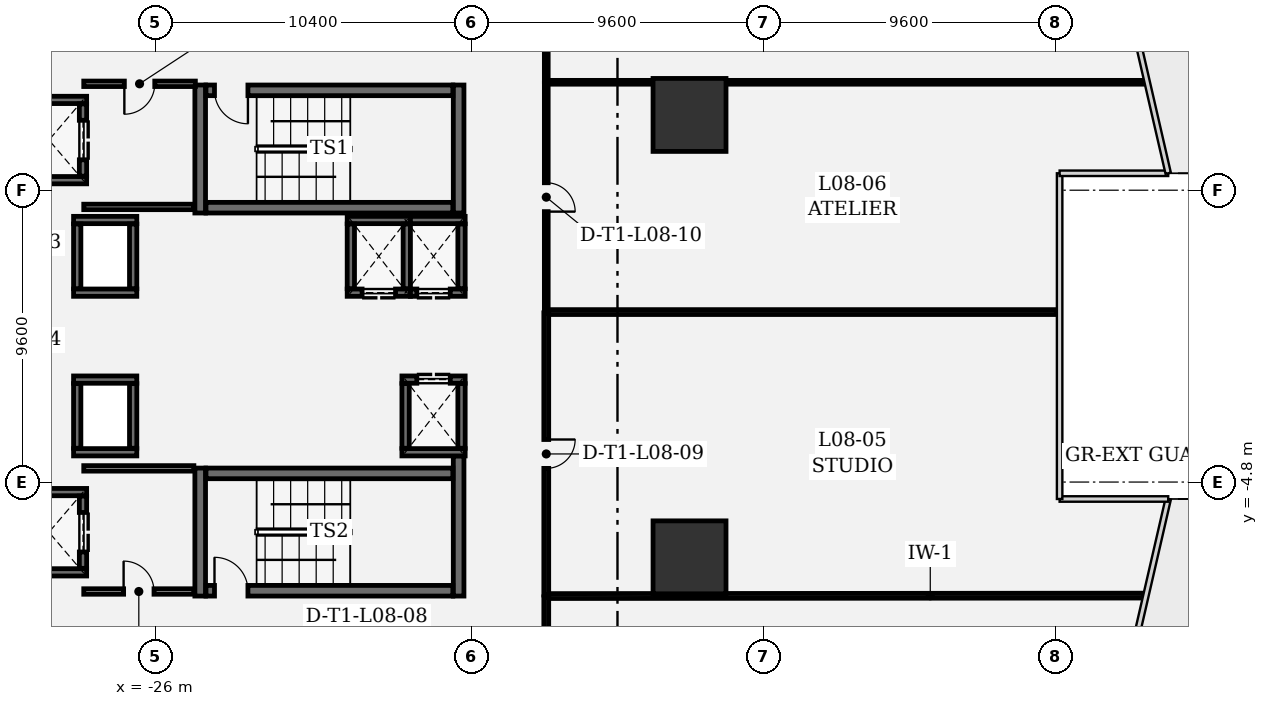
"""IFC4 building model, lengths in metres.
Left out: names, types, materials, properties, quantities, classifications, styles, units other than length and angle.
Written with IfcOpenShell. Run it as: python <this file> out.ifc"""

import sys

from ifc_helpers import new_model, si_unit, direction, frame, frame_2d, origin, origin_2d, place, context, subcontext, project, spatial, rectangle, extrude, element, fill, save


model = new_model("IFC4")
c1 = context("Model", 3, precision=1e-05, world=origin(), true_north=direction((0.0, 1.0)))
c2 = subcontext(c1, "Body", "Model", "MODEL_VIEW")
j1 = project(units=[si_unit("LENGTHUNIT", "METRE"), si_unit("PLANEANGLEUNIT", "RADIAN")], contexts=[c1])
p1 = place(None, origin())
s1 = spatial("IfcSite", under=j1, at=p1, CompositionType="ELEMENT")
p2 = place(p1, origin())
s2 = spatial("IfcBuilding", under=s1, at=p2, CompositionType="ELEMENT")
p3 = place(p2, frame((0.0, 0.0, 40.8)))
s3 = spatial("IfcBuildingStorey", under=s2, at=p3, CompositionType="ELEMENT", Elevation=40.8)
for number, where, z_axis, x_axis in (
    (1, (-8.43, -7.276, 0.0), (0.0, 0.0, 1.0), (1.0, 0.0, 0.0)),
    (2, (-8.43, 7.276, 0.0), (0.0, 0.0, 1.0), (1.0, 0.0, 0.0)),
):
    element("IfcColumn", number, at=place(p3, frame(where, z_axis=z_axis, x_axis=x_axis)), inside=s3, PredefinedType="COLUMN", context=c2, shape_type="SweptSolid", body=[
        extrude(rectangle(XDim=2.4, YDim=2.4, at=origin_2d()), origin(), (0.0, 0.0, 1.0), 4.2),
    ])
for number, where, z_axis, x_axis in (
    (3, (-24.525, 8.26, 0.0), (0.0, 0.0, 1.0), (0.0, -1.0, 0.0)),
    (4, (-16.025, 4.05, 0.0), (0.0, 0.0, 1.0), (0.0, 1.0, 0.0)),
):
    element("IfcWall", number, at=place(p3, frame(where, z_axis=z_axis, x_axis=x_axis)), inside=s3, PredefinedType="SHEAR", context=c2, shape_type="SweptSolid", body=[
        extrude(rectangle(XDim=4.21, YDim=0.35, at=frame_2d((2.105, 0.0))), origin(), (0.0, 0.0, 1.0), 3.92),
    ])
p4 = place(p3, frame((-24.335, 4.225, 0.0), z_axis=(0.0, 0.0, 1.0), x_axis=(1.0, 0.0, 0.0)))
e5 = element("IfcWall", 5, at=p4, inside=s3, PredefinedType="SHEAR", context=c2, shape_type="SweptSolid", body=[
    extrude(rectangle(XDim=8.12, YDim=0.35, at=frame_2d((4.06, 0.0))), origin(), (0.0, 0.0, 1.0), 3.92),
])
p5 = place(p3, frame((-16.215, 8.085, 0.0), z_axis=(0.0, 0.0, 1.0), x_axis=(-1.0, 0.0, 0.0)))
e6 = element("IfcWall", 6, at=p5, inside=s3, PredefinedType="SHEAR", context=c2, shape_type="SweptSolid", body=[
    extrude(rectangle(XDim=8.12, YDim=0.35, at=frame_2d((4.06, 0.0))), origin(), (0.0, 0.0, 1.0), 3.92),
])
p6 = place(p5, frame((6.74, 0.0, 0.0)))
e7 = element("IfcOpeningElement", 7, at=p6, cuts=e6, PredefinedType="OPENING", context=c2, shape_type="SweptSolid", body=[
    extrude(rectangle(XDim=1.1, YDim=2.2, at=frame_2d((0.55, 1.1))), frame((0.0, 0.185, 0.0), z_axis=(0.0, -1.0, 0.0), x_axis=(1.0, 0.0, 0.0)), (0.0, 0.0, 1.0), 0.37),
])
p7 = place(p3, frame((-24.525, -4.34, 0.0), z_axis=(0.0, 0.0, 1.0), x_axis=(0.0, -1.0, 0.0)))
e8 = element("IfcWall", 8, at=p7, inside=s3, PredefinedType="SHEAR", context=c2, shape_type="SweptSolid", body=[
    extrude(rectangle(XDim=4.21, YDim=0.35, at=frame_2d((2.105, 0.0))), origin(), (0.0, 0.0, 1.0), 3.92),
])
p8 = place(p3, frame((-16.025, -8.55, 0.0), z_axis=(0.0, 0.0, 1.0), x_axis=(0.0, 1.0, 0.0)))
e9 = element("IfcWall", 9, at=p8, inside=s3, PredefinedType="SHEAR", context=c2, shape_type="SweptSolid", body=[
    extrude(rectangle(XDim=4.61, YDim=0.35, at=frame_2d((2.305, 0.0))), origin(), (0.0, 0.0, 1.0), 3.92),
])
p9 = place(p3, frame((-24.335, -8.375, 0.0), z_axis=(0.0, 0.0, 1.0), x_axis=(1.0, 0.0, 0.0)))
e10 = element("IfcWall", 10, at=p9, inside=s3, PredefinedType="SHEAR", context=c2, shape_type="SweptSolid", body=[
    extrude(rectangle(XDim=8.12, YDim=0.35, at=frame_2d((4.06, 0.0))), origin(), (0.0, 0.0, 1.0), 3.92),
])
p10 = place(p9, frame((0.28, 0.0, 0.0)))
e11 = element("IfcOpeningElement", 11, at=p10, cuts=e10, PredefinedType="OPENING", context=c2, shape_type="SweptSolid", body=[
    extrude(rectangle(XDim=1.1, YDim=2.2, at=frame_2d((0.55, 1.1))), frame((0.0, 0.185, 0.0), z_axis=(0.0, -1.0, 0.0), x_axis=(1.0, 0.0, 0.0)), (0.0, 0.0, 1.0), 0.37),
])
p11 = place(p3, frame((-16.215, -4.515, 0.0), z_axis=(0.0, 0.0, 1.0), x_axis=(-1.0, 0.0, 0.0)))
e12 = element("IfcWall", 12, at=p11, inside=s3, PredefinedType="SHEAR", context=c2, shape_type="SweptSolid", body=[
    extrude(rectangle(XDim=8.12, YDim=0.35, at=frame_2d((4.06, 0.0))), origin(), (0.0, 0.0, 1.0), 3.92),
])
for number, where, z_axis, x_axis in (
    (13, (-28.26, 5.13, 0.0), (0.0, 0.0, 1.0), (-1.0, 0.0, 0.0)),
    (14, (-30.74, 7.77, 0.0), (0.0, 0.0, 1.0), (1.0, 0.0, 0.0)),
):
    element("IfcWall", number, at=place(p3, frame(where, z_axis=z_axis, x_axis=x_axis)), inside=s3, PredefinedType="SHEAR", context=c2, shape_type="SweptSolid", body=[
        extrude(rectangle(XDim=2.48, YDim=0.24, at=frame_2d((1.24, 0.0))), origin(), (0.0, 0.0, 1.0), 3.92),
    ])
p12 = place(p3, frame((-28.38, 7.638, 0.0), z_axis=(0.0, 0.0, 1.0), x_axis=(0.0, -1.0, 0.0)))
e15 = element("IfcWall", 15, at=p12, inside=s3, PredefinedType="SHEAR", context=c2, shape_type="SweptSolid", body=[
    extrude(rectangle(XDim=2.376, YDim=0.24, at=frame_2d((1.188, 0.0))), origin(), (0.0, 0.0, 1.0), 3.92),
])
p13 = place(p12, frame((0.538, 0.0, 0.0)))
e16 = element("IfcOpeningElement", 16, at=p13, cuts=e15, PredefinedType="OPENING", context=c2, shape_type="SweptSolid", body=[
    extrude(rectangle(XDim=1.3, YDim=2.3, at=frame_2d((0.65, 1.15))), frame((0.0, 0.13, 0.0), z_axis=(0.0, -1.0, 0.0), x_axis=(1.0, 0.0, 0.0)), (0.0, 0.0, 1.0), 0.26),
])
for number, where, z_axis, x_axis in (
    (17, (-28.26, -7.77, 0.0), (0.0, 0.0, 1.0), (-1.0, 0.0, 0.0)),
    (18, (-30.74, -5.13, 0.0), (0.0, 0.0, 1.0), (1.0, 0.0, 0.0)),
):
    element("IfcWall", number, at=place(p3, frame(where, z_axis=z_axis, x_axis=x_axis)), inside=s3, PredefinedType="SHEAR", context=c2, shape_type="SweptSolid", body=[
        extrude(rectangle(XDim=2.48, YDim=0.24, at=frame_2d((1.24, 0.0))), origin(), (0.0, 0.0, 1.0), 3.92),
    ])
p14 = place(p3, frame((-28.38, -5.262, 0.0), z_axis=(0.0, 0.0, 1.0), x_axis=(0.0, -1.0, 0.0)))
e19 = element("IfcWall", 19, at=p14, inside=s3, PredefinedType="SHEAR", context=c2, shape_type="SweptSolid", body=[
    extrude(rectangle(XDim=2.376, YDim=0.24, at=frame_2d((1.188, 0.0))), origin(), (0.0, 0.0, 1.0), 3.92),
])
p15 = place(p14, frame((0.538, 0.0, 0.0)))
e20 = element("IfcOpeningElement", 20, at=p15, cuts=e19, PredefinedType="OPENING", context=c2, shape_type="SweptSolid", body=[
    extrude(rectangle(XDim=1.3, YDim=2.3, at=frame_2d((0.65, 1.15))), frame((0.0, 0.13, 0.0), z_axis=(0.0, -1.0, 0.0), x_axis=(1.0, 0.0, 0.0)), (0.0, 0.0, 1.0), 0.26),
])
for number, where, z_axis, x_axis in (
    (21, (-26.61, 1.43, 0.0), (0.0, 0.0, 1.0), (-1.0, 0.0, 0.0)),
    (22, (-28.69, 3.82, 0.0), (0.0, 0.0, 1.0), (1.0, 0.0, 0.0)),
):
    element("IfcWall", number, at=place(p3, frame(where, z_axis=z_axis, x_axis=x_axis)), inside=s3, PredefinedType="SHEAR", context=c2, shape_type="SweptSolid", body=[
        extrude(rectangle(XDim=2.08, YDim=0.24, at=frame_2d((1.04, 0.0))), origin(), (0.0, 0.0, 1.0), 3.92),
    ])
for number, where, z_axis, x_axis in (
    (23, (-28.57, 1.562, 0.0), (0.0, 0.0, 1.0), (0.0, 1.0, 0.0)),
    (24, (-26.73, 3.688, 0.0), (0.0, 0.0, 1.0), (0.0, -1.0, 0.0)),
):
    element("IfcWall", number, at=place(p3, frame(where, z_axis=z_axis, x_axis=x_axis)), inside=s3, PredefinedType="SHEAR", context=c2, shape_type="SweptSolid", body=[
        extrude(rectangle(XDim=2.126, YDim=0.24, at=frame_2d((1.063, 0.0))), origin(), (0.0, 0.0, 1.0), 3.92),
    ])
p16 = place(p3, frame((-17.61, 1.43, 0.0), z_axis=(0.0, 0.0, 1.0), x_axis=(-1.0, 0.0, 0.0)))
e25 = element("IfcWall", 25, at=p16, inside=s3, PredefinedType="SHEAR", context=c2, shape_type="SweptSolid", body=[
    extrude(rectangle(XDim=2.08, YDim=0.24, at=frame_2d((1.04, 0.0))), origin(), (0.0, 0.0, 1.0), 3.92),
])
p17 = place(p16, frame((0.49, 0.0, 0.0)))
e26 = element("IfcOpeningElement", 26, at=p17, cuts=e25, PredefinedType="OPENING", context=c2, shape_type="SweptSolid", body=[
    extrude(rectangle(XDim=1.1, YDim=2.2, at=frame_2d((0.55, 1.1))), frame((0.0, 0.13, 0.0), z_axis=(0.0, -1.0, 0.0), x_axis=(1.0, 0.0, 0.0)), (0.0, 0.0, 1.0), 0.26),
])
p18 = place(p3, frame((-19.69, 3.82, 0.0), z_axis=(0.0, 0.0, 1.0), x_axis=(1.0, 0.0, 0.0)))
e27 = element("IfcWall", 27, at=p18, inside=s3, PredefinedType="SHEAR", context=c2, shape_type="SweptSolid", body=[
    extrude(rectangle(XDim=2.08, YDim=0.24, at=frame_2d((1.04, 0.0))), origin(), (0.0, 0.0, 1.0), 3.92),
])
for number, where, z_axis, x_axis in (
    (28, (-19.57, 1.562, 0.0), (0.0, 0.0, 1.0), (0.0, 1.0, 0.0)),
    (29, (-17.73, 3.688, 0.0), (0.0, 0.0, 1.0), (0.0, -1.0, 0.0)),
):
    element("IfcWall", number, at=place(p3, frame(where, z_axis=z_axis, x_axis=x_axis)), inside=s3, PredefinedType="SHEAR", context=c2, shape_type="SweptSolid", body=[
        extrude(rectangle(XDim=2.126, YDim=0.24, at=frame_2d((1.063, 0.0))), origin(), (0.0, 0.0, 1.0), 3.92),
    ])
p19 = place(p3, frame((-15.81, 1.43, 0.0), z_axis=(0.0, 0.0, 1.0), x_axis=(-1.0, 0.0, 0.0)))
e30 = element("IfcWall", 30, at=p19, inside=s3, PredefinedType="SHEAR", context=c2, shape_type="SweptSolid", body=[
    extrude(rectangle(XDim=1.8, YDim=0.24, at=frame_2d((0.9, 0.0))), origin(), (0.0, 0.0, 1.0), 3.92),
])
p20 = place(p19, frame((0.49, 0.0, 0.0)))
e31 = element("IfcOpeningElement", 31, at=p20, cuts=e30, PredefinedType="OPENING", context=c2, shape_type="SweptSolid", body=[
    extrude(rectangle(XDim=1.1, YDim=2.2, at=frame_2d((0.55, 1.1))), frame((0.0, 0.13, 0.0), z_axis=(0.0, -1.0, 0.0), x_axis=(1.0, 0.0, 0.0)), (0.0, 0.0, 1.0), 0.26),
])
p21 = place(p3, frame((-17.61, 3.82, 0.0), z_axis=(0.0, 0.0, 1.0), x_axis=(1.0, 0.0, 0.0)))
e32 = element("IfcWall", 32, at=p21, inside=s3, PredefinedType="SHEAR", context=c2, shape_type="SweptSolid", body=[
    extrude(rectangle(XDim=1.8, YDim=0.24, at=frame_2d((0.9, 0.0))), origin(), (0.0, 0.0, 1.0), 3.92),
])
p22 = place(p3, frame((-15.93, 3.688, 0.0), z_axis=(0.0, 0.0, 1.0), x_axis=(0.0, -1.0, 0.0)))
e33 = element("IfcWall", 33, at=p22, inside=s3, PredefinedType="SHEAR", context=c2, shape_type="SweptSolid", body=[
    extrude(rectangle(XDim=2.126, YDim=0.24, at=frame_2d((1.063, 0.0))), origin(), (0.0, 0.0, 1.0), 3.92),
])
for number, where, z_axis, x_axis in (
    (34, (-26.61, -3.82, 0.0), (0.0, 0.0, 1.0), (-1.0, 0.0, 0.0)),
    (35, (-28.69, -1.43, 0.0), (0.0, 0.0, 1.0), (1.0, 0.0, 0.0)),
):
    element("IfcWall", number, at=place(p3, frame(where, z_axis=z_axis, x_axis=x_axis)), inside=s3, PredefinedType="SHEAR", context=c2, shape_type="SweptSolid", body=[
        extrude(rectangle(XDim=2.08, YDim=0.24, at=frame_2d((1.04, 0.0))), origin(), (0.0, 0.0, 1.0), 3.92),
    ])
for number, where, z_axis, x_axis in (
    (36, (-28.57, -3.688, 0.0), (0.0, 0.0, 1.0), (0.0, 1.0, 0.0)),
    (37, (-26.73, -1.562, 0.0), (0.0, 0.0, 1.0), (0.0, -1.0, 0.0)),
):
    element("IfcWall", number, at=place(p3, frame(where, z_axis=z_axis, x_axis=x_axis)), inside=s3, PredefinedType="SHEAR", context=c2, shape_type="SweptSolid", body=[
        extrude(rectangle(XDim=2.126, YDim=0.24, at=frame_2d((1.063, 0.0))), origin(), (0.0, 0.0, 1.0), 3.92),
    ])
p23 = place(p3, frame((-15.81, -3.82, 0.0), z_axis=(0.0, 0.0, 1.0), x_axis=(-1.0, 0.0, 0.0)))
e38 = element("IfcWall", 38, at=p23, inside=s3, PredefinedType="SHEAR", context=c2, shape_type="SweptSolid", body=[
    extrude(rectangle(XDim=2.08, YDim=0.24, at=frame_2d((1.04, 0.0))), origin(), (0.0, 0.0, 1.0), 3.92),
])
p24 = place(p3, frame((-17.89, -1.43, 0.0), z_axis=(0.0, 0.0, 1.0), x_axis=(1.0, 0.0, 0.0)))
e39 = element("IfcWall", 39, at=p24, inside=s3, PredefinedType="SHEAR", context=c2, shape_type="SweptSolid", body=[
    extrude(rectangle(XDim=2.08, YDim=0.24, at=frame_2d((1.04, 0.0))), origin(), (0.0, 0.0, 1.0), 3.92),
])
p25 = place(p24, frame((0.49, 0.0, 0.0)))
e40 = element("IfcOpeningElement", 40, at=p25, cuts=e39, PredefinedType="OPENING", context=c2, shape_type="SweptSolid", body=[
    extrude(rectangle(XDim=1.1, YDim=2.2, at=frame_2d((0.55, 1.1))), frame((0.0, 0.13, 0.0), z_axis=(0.0, -1.0, 0.0), x_axis=(1.0, 0.0, 0.0)), (0.0, 0.0, 1.0), 0.26),
])
for number, where, z_axis, x_axis in (
    (41, (-17.77, -3.688, 0.0), (0.0, 0.0, 1.0), (0.0, 1.0, 0.0)),
    (42, (-15.93, -1.562, 0.0), (0.0, 0.0, 1.0), (0.0, -1.0, 0.0)),
):
    element("IfcWall", number, at=place(p3, frame(where, z_axis=z_axis, x_axis=x_axis)), inside=s3, PredefinedType="SHEAR", context=c2, shape_type="SweptSolid", body=[
        extrude(rectangle(XDim=2.126, YDim=0.24, at=frame_2d((1.063, 0.0))), origin(), (0.0, 0.0, 1.0), 3.92),
    ])
p26 = place(p3, frame((-28.355, 4.25, 0.0), z_axis=(0.0, 0.0, 1.0), x_axis=(1.0, 0.0, 0.0)))
e43 = element("IfcWall", 43, at=p26, inside=s3, PredefinedType="PARTITIONING", context=c2, shape_type="SweptSolid", body=[
    extrude(rectangle(XDim=3.622, YDim=0.18, at=frame_2d((1.811, 0.0))), origin(), (0.0, 0.0, 1.0), 3.92),
])
p27 = place(p3, frame((-24.684, 8.3, 0.0), z_axis=(0.0, 0.0, 1.0), x_axis=(-1.0, 0.0, 0.0)))
e44 = element("IfcWall", 44, at=p27, inside=s3, PredefinedType="PARTITIONING", context=c2, shape_type="SweptSolid", body=[
    extrude(rectangle(XDim=3.671, YDim=0.18, at=frame_2d((1.835, 0.0))), origin(), (0.0, 0.0, 1.0), 3.92),
])
p28 = place(p27, frame((1.335, 0.0, 0.0)))
e45 = element("IfcOpeningElement", 45, at=p28, cuts=e44, PredefinedType="OPENING", context=c2, shape_type="SweptSolid", body=[
    extrude(rectangle(XDim=1.0, YDim=2.15, at=frame_2d((0.5, 1.075))), frame((0.0, 0.1, 0.0), z_axis=(0.0, -1.0, 0.0), x_axis=(1.0, 0.0, 0.0)), (0.0, 0.0, 1.0), 0.2),
])
p29 = place(p3, frame((-28.355, -8.4, 0.0), z_axis=(0.0, 0.0, 1.0), x_axis=(1.0, 0.0, 0.0)))
e46 = element("IfcWall", 46, at=p29, inside=s3, PredefinedType="PARTITIONING", context=c2, shape_type="SweptSolid", body=[
    extrude(rectangle(XDim=3.622, YDim=0.18, at=frame_2d((1.811, 0.0))), origin(), (0.0, 0.0, 1.0), 3.92),
])
p30 = place(p29, frame((1.311, 0.0, 0.0)))
e47 = element("IfcOpeningElement", 47, at=p30, cuts=e46, PredefinedType="OPENING", context=c2, shape_type="SweptSolid", body=[
    extrude(rectangle(XDim=1.0, YDim=2.15, at=frame_2d((0.5, 1.075))), frame((0.0, 0.1, 0.0), z_axis=(0.0, -1.0, 0.0), x_axis=(1.0, 0.0, 0.0)), (0.0, 0.0, 1.0), 0.2),
])
p31 = place(p3, frame((-24.733, -4.35, 0.0), z_axis=(0.0, 0.0, 1.0), x_axis=(-1.0, 0.0, 0.0)))
e48 = element("IfcWall", 48, at=p31, inside=s3, PredefinedType="PARTITIONING", context=c2, shape_type="SweptSolid", body=[
    extrude(rectangle(XDim=3.622, YDim=0.18, at=frame_2d((1.811, 0.0))), origin(), (0.0, 0.0, 1.0), 3.92),
])
p32 = place(p3, frame((-13.142, 8.375, 0.0), z_axis=(0.0, 0.0, 1.0), x_axis=(0.0, 1.0, 0.0)))
e49 = element("IfcWall", 49, at=p32, inside=s3, PredefinedType="PARTITIONING", context=c2, shape_type="SweptSolid", body=[
    extrude(rectangle(XDim=2.358, YDim=0.125, at=frame_2d((1.179, 0.0))), origin(), (0.0, 0.0, 1.0), 3.92),
])
p33 = place(p3, frame((-13.117, 8.35, 0.0), z_axis=(0.0, 0.0, 1.0), x_axis=(1.0, 0.0, 0.0)))
e50 = element("IfcWall", 50, at=p33, inside=s3, PredefinedType="PARTITIONING", context=c2, shape_type="SweptSolid", body=[
    extrude(rectangle(XDim=3.422, YDim=0.125, at=frame_2d((1.711, 0.0))), origin(), (0.0, 0.0, 1.0), 2.957),
])
p34 = place(p3, frame((-7.165, 8.35, 0.0), z_axis=(0.0, 0.0, 1.0), x_axis=(1.0, 0.0, 0.0)))
e51 = element("IfcWall", 51, at=p34, inside=s3, PredefinedType="PARTITIONING", context=c2, shape_type="SweptSolid", body=[
    extrude(rectangle(XDim=13.71, YDim=0.125, at=frame_2d((6.855, 0.0))), origin(), (0.0, 0.0, 1.0), 3.92),
])
p35 = place(p3, frame((6.502, -8.535, 0.0), z_axis=(0.0, 0.0, 1.0), x_axis=(-0.999999692694, -0.000783971885, 0.0)))
e52 = element("IfcWall", 52, at=p35, inside=s3, PredefinedType="PARTITIONING", context=c2, shape_type="SweptSolid", body=[
    extrude(rectangle(XDim=19.619, YDim=0.16, at=frame_2d((9.81, 0.0))), origin(), (0.0, 0.0, 1.0), 2.957),
])
p36 = place(p3, frame((-13.142, -8.575, 0.0), z_axis=(0.0, 0.0, 1.0), x_axis=(0.0, -1.0, 0.0)))
e53 = element("IfcWall", 53, at=p36, inside=s3, PredefinedType="PARTITIONING", context=c2, shape_type="SweptSolid", body=[
    extrude(rectangle(XDim=2.358, YDim=0.16, at=frame_2d((1.179, 0.0))), origin(), (0.0, 0.0, 1.0), 3.92),
])
p37 = place(p3, frame((3.663, 0.791, 0.0), z_axis=(0.0, 0.0, 1.0), x_axis=(-1.0, 0.0, 0.0)))
e54 = element("IfcWall", 54, at=p37, inside=s3, PredefinedType="PARTITIONING", context=c2, shape_type="SweptSolid", body=[
    extrude(rectangle(XDim=16.78, YDim=0.16, at=frame_2d((8.39, 0.0))), origin(), (0.0, 0.0, 1.0), 3.92),
])
p38 = place(p3, frame((-13.142, 0.766, 0.0), z_axis=(0.0, 0.0, 1.0), x_axis=(0.0, -1.0, 0.0)))
e55 = element("IfcWall", 55, at=p38, inside=s3, PredefinedType="PARTITIONING", context=c2, shape_type="SweptSolid", body=[
    extrude(rectangle(XDim=9.283, YDim=0.16, at=frame_2d((4.642, 0.0))), origin(), (0.0, 0.0, 1.0), 3.92),
])
p39 = place(p38, frame((4.167, 0.0, 0.0)))
e56 = element("IfcOpeningElement", 56, at=p39, cuts=e55, PredefinedType="OPENING", context=c2, shape_type="SweptSolid", body=[
    extrude(rectangle(XDim=0.95, YDim=2.15, at=frame_2d((0.475, 1.075))), frame((0.0, 0.09, 0.0), z_axis=(0.0, -1.0, 0.0), x_axis=(1.0, 0.0, 0.0)), (0.0, 0.0, 1.0), 0.18),
])
p40 = place(p3, frame((-13.142, 8.317, 0.0), z_axis=(0.0, 0.0, 1.0), x_axis=(0.0, -1.0, 0.0)))
e57 = element("IfcWall", 57, at=p40, inside=s3, PredefinedType="PARTITIONING", context=c2, shape_type="SweptSolid", body=[
    extrude(rectangle(XDim=7.493, YDim=0.125, at=frame_2d((3.746, 0.0))), origin(), (0.0, 0.0, 1.0), 3.92),
])
p41 = place(p40, frame((3.271, 0.0, 0.0)))
e58 = element("IfcOpeningElement", 58, at=p41, cuts=e57, PredefinedType="OPENING", context=c2, shape_type="SweptSolid", body=[
    extrude(rectangle(XDim=0.95, YDim=2.15, at=frame_2d((0.475, 1.075))), frame((0.0, 0.073, 0.0), z_axis=(0.0, -1.0, 0.0), x_axis=(1.0, 0.0, 0.0)), (0.0, 0.0, 1.0), 0.145),
])
p42 = place(p6, origin())
e59 = element("IfcDoor", 59, at=p42, inside=s3, OperationType="SINGLE_SWING_LEFT", PredefinedType="DOOR", context=c2, shape_type="SweptSolid", body=[
    extrude(rectangle(XDim=1.1, YDim=2.2, at=frame_2d((0.55, 1.1))), frame((0.0, 0.025, 0.0), z_axis=(0.0, -1.0, 0.0), x_axis=(1.0, 0.0, 0.0)), (0.0, 0.0, 1.0), 0.05),
])
fill(e7, e59)
p43 = place(p10, origin())
e60 = element("IfcDoor", 60, at=p43, inside=s3, OperationType="SINGLE_SWING_LEFT", PredefinedType="DOOR", context=c2, shape_type="SweptSolid", body=[
    extrude(rectangle(XDim=1.1, YDim=2.2, at=frame_2d((0.55, 1.1))), frame((0.0, 0.025, 0.0), z_axis=(0.0, -1.0, 0.0), x_axis=(1.0, 0.0, 0.0)), (0.0, 0.0, 1.0), 0.05),
])
fill(e11, e60)
p44 = place(p13, origin())
e61 = element("IfcDoor", 61, at=p44, inside=s3, OperationType="DOUBLE_DOOR_SLIDING", PredefinedType="DOOR", context=c2, shape_type="SweptSolid", body=[
    extrude(rectangle(XDim=1.3, YDim=2.3, at=frame_2d((0.65, 1.15))), frame((0.0, 0.025, 0.0), z_axis=(0.0, -1.0, 0.0), x_axis=(1.0, 0.0, 0.0)), (0.0, 0.0, 1.0), 0.05),
])
fill(e16, e61)
p45 = place(p15, origin())
e62 = element("IfcDoor", 62, at=p45, inside=s3, OperationType="DOUBLE_DOOR_SLIDING", PredefinedType="DOOR", context=c2, shape_type="SweptSolid", body=[
    extrude(rectangle(XDim=1.3, YDim=2.3, at=frame_2d((0.65, 1.15))), frame((0.0, 0.025, 0.0), z_axis=(0.0, -1.0, 0.0), x_axis=(1.0, 0.0, 0.0)), (0.0, 0.0, 1.0), 0.05),
])
fill(e20, e62)
p46 = place(p17, origin())
e63 = element("IfcDoor", 63, at=p46, inside=s3, OperationType="DOUBLE_DOOR_SLIDING", PredefinedType="DOOR", context=c2, shape_type="SweptSolid", body=[
    extrude(rectangle(XDim=1.1, YDim=2.2, at=frame_2d((0.55, 1.1))), frame((0.0, 0.025, 0.0), z_axis=(0.0, -1.0, 0.0), x_axis=(1.0, 0.0, 0.0)), (0.0, 0.0, 1.0), 0.05),
])
fill(e26, e63)
p47 = place(p20, origin())
e64 = element("IfcDoor", 64, at=p47, inside=s3, OperationType="DOUBLE_DOOR_SLIDING", PredefinedType="DOOR", context=c2, shape_type="SweptSolid", body=[
    extrude(rectangle(XDim=1.1, YDim=2.2, at=frame_2d((0.55, 1.1))), frame((0.0, 0.025, 0.0), z_axis=(0.0, -1.0, 0.0), x_axis=(1.0, 0.0, 0.0)), (0.0, 0.0, 1.0), 0.05),
])
fill(e31, e64)
p48 = place(p25, origin())
e65 = element("IfcDoor", 65, at=p48, inside=s3, OperationType="DOUBLE_DOOR_SLIDING", PredefinedType="DOOR", context=c2, shape_type="SweptSolid", body=[
    extrude(rectangle(XDim=1.1, YDim=2.2, at=frame_2d((0.55, 1.1))), frame((0.0, 0.025, 0.0), z_axis=(0.0, -1.0, 0.0), x_axis=(1.0, 0.0, 0.0)), (0.0, 0.0, 1.0), 0.05),
])
fill(e40, e65)
p49 = place(p39, origin())
e66 = element("IfcDoor", 66, at=p49, inside=s3, OperationType="SINGLE_SWING_LEFT", PredefinedType="DOOR", context=c2, shape_type="SweptSolid", body=[
    extrude(rectangle(XDim=0.95, YDim=2.15, at=frame_2d((0.475, 1.075))), frame((0.0, 0.025, 0.0), z_axis=(0.0, -1.0, 0.0), x_axis=(1.0, 0.0, 0.0)), (0.0, 0.0, 1.0), 0.05),
])
fill(e56, e66)
p50 = place(p41, origin())
e67 = element("IfcDoor", 67, at=p50, inside=s3, OperationType="SINGLE_SWING_RIGHT", PredefinedType="DOOR", context=c2, shape_type="SweptSolid", body=[
    extrude(rectangle(XDim=0.95, YDim=2.15, at=frame_2d((0.475, 1.075))), frame((0.0, 0.025, 0.0), z_axis=(0.0, -1.0, 0.0), x_axis=(1.0, 0.0, 0.0)), (0.0, 0.0, 1.0), 0.05),
])
fill(e58, e67)
p51 = place(p28, origin())
e68 = element("IfcDoor", 68, at=p51, inside=s3, OperationType="SINGLE_SWING_RIGHT", PredefinedType="DOOR", context=c2, shape_type="SweptSolid", body=[
    extrude(rectangle(XDim=1.0, YDim=2.15, at=frame_2d((0.5, 1.075))), frame((0.0, 0.025, 0.0), z_axis=(0.0, -1.0, 0.0), x_axis=(1.0, 0.0, 0.0)), (0.0, 0.0, 1.0), 0.05),
])
fill(e45, e68)
p52 = place(p30, origin())
e69 = element("IfcDoor", 69, at=p52, inside=s3, OperationType="SINGLE_SWING_LEFT", PredefinedType="DOOR", context=c2, shape_type="SweptSolid", body=[
    extrude(rectangle(XDim=1.0, YDim=2.15, at=frame_2d((0.5, 1.075))), frame((0.0, 0.025, 0.0), z_axis=(0.0, -1.0, 0.0), x_axis=(1.0, 0.0, 0.0)), (0.0, 0.0, 1.0), 0.05),
])
fill(e47, e69)
save(model, sys.argv[1])
